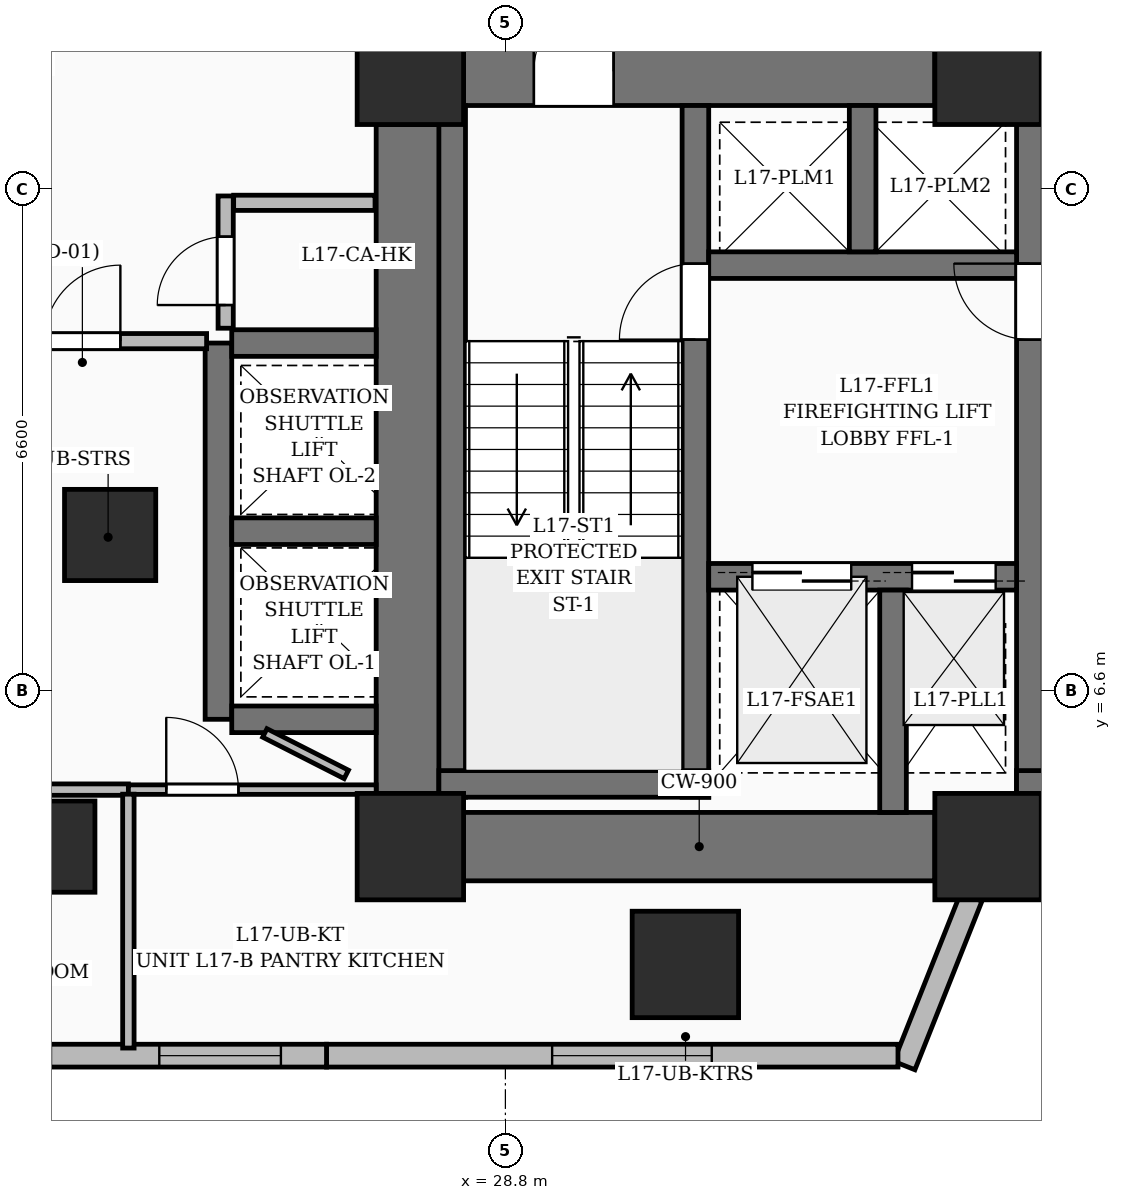
"""IFC4 building model, lengths in metres.
Left out: names, types, materials, properties, quantities, classifications, styles, units other than length and angle.
Written with IfcOpenShell. Run it as: python <this file> out.ifc"""

import sys

from ifc_helpers import new_model, si_unit, direction, frame, frame_2d, origin, origin_2d, place, context, subcontext, project, spatial, rectangle, extrude, element, fill, save


model = new_model("IFC4")
c1 = context("Model", 3, precision=1e-05, world=origin(), true_north=direction((0.0, 1.0)))
c2 = subcontext(c1, "Body", "Model", "MODEL_VIEW")
j1 = project(units=[si_unit("LENGTHUNIT", "METRE"), si_unit("PLANEANGLEUNIT", "RADIAN")], contexts=[c1])
p1 = place(None, origin())
s1 = spatial("IfcSite", under=j1, at=p1, CompositionType="ELEMENT")
p2 = place(p1, origin())
s2 = spatial("IfcBuilding", under=s1, at=p2, CompositionType="ELEMENT")
p3 = place(p2, frame((0.0, 0.0, 71.4)))
s3 = spatial("IfcBuildingStorey", under=s2, at=p3, CompositionType="ELEMENT", Elevation=71.4)
for number, where, z_axis, x_axis in (
    (1, (27.55, 4.55, 0.0), (0.0, 0.0, 1.0), (1.0, 0.0, 0.0)),
    (2, (35.15, 4.55, 0.0), (0.0, 0.0, 1.0), (1.0, 0.0, 0.0)),
    (3, (27.55, 14.75, 0.0), (0.0, 0.0, 1.0), (1.0, 0.0, 0.0)),
    (4, (35.15, 14.75, 0.0), (0.0, 0.0, 1.0), (1.0, 0.0, 0.0)),
):
    element("IfcColumn", number, at=place(p3, frame(where, z_axis=z_axis, x_axis=x_axis)), inside=s3, PredefinedType="COLUMN", context=c2, shape_type="SweptSolid", body=[
        extrude(rectangle(XDim=1.4, YDim=1.4, at=origin_2d()), origin(), (0.0, 0.0, 1.0), 3.6),
    ])
for number, where, z_axis, x_axis in (
    (5, (22.8, 4.55, 0.0), (0.0, 0.0, 1.0), (1.0, 0.0, 0.0)),
    (6, (23.6, 8.65, 0.0), (0.0, 0.0, 1.0), (1.0, 0.0, 0.0)),
):
    element("IfcColumn", number, at=place(p3, frame(where, z_axis=z_axis, x_axis=x_axis)), inside=s3, PredefinedType="COLUMN", context=c2, shape_type="SweptSolid", body=[
        extrude(rectangle(XDim=1.2, YDim=1.2, at=origin_2d()), origin(), (0.0, 0.0, 1.0), 3.6),
    ])
p4 = place(p3, frame((28.25, 4.55, 0.0), z_axis=(0.0, 0.0, 1.0), x_axis=(1.0, 0.0, 0.0)))
e7 = element("IfcWall", 7, at=p4, inside=s3, PredefinedType="SHEAR", context=c2, shape_type="SweptSolid", body=[
    extrude(rectangle(XDim=6.2, YDim=0.9, at=frame_2d((3.1, 0.0))), origin(), (0.0, 0.0, 1.0), 3.6),
])
p5 = place(p3, frame((28.25, 14.75, 0.0), z_axis=(0.0, 0.0, 1.0), x_axis=(1.0, 0.0, 0.0)))
e8 = element("IfcWall", 8, at=p5, inside=s3, PredefinedType="SHEAR", context=c2, shape_type="SweptSolid", body=[
    extrude(rectangle(XDim=6.2, YDim=0.9, at=frame_2d((3.1, 0.0))), origin(), (0.0, 0.0, 1.0), 3.6),
])
p6 = place(p5, frame((0.925, 0.0, 0.0)))
e9 = element("IfcOpeningElement", 9, at=p6, cuts=e8, PredefinedType="OPENING", context=c2, shape_type="SweptSolid", body=[
    extrude(rectangle(XDim=1.05, YDim=2.15, at=frame_2d((0.525, 1.075))), frame((0.0, 0.46, 0.0), z_axis=(0.0, -1.0, 0.0), x_axis=(1.0, 0.0, 0.0)), (0.0, 0.0, 1.0), 0.92),
])
p7 = place(p3, frame((27.55, 5.25, 0.0), z_axis=(0.0, 0.0, 1.0), x_axis=(0.0, 1.0, 0.0)))
e10 = element("IfcWall", 10, at=p7, inside=s3, PredefinedType="SHEAR", context=c2, shape_type="SweptSolid", body=[
    extrude(rectangle(XDim=8.8, YDim=0.9, at=frame_2d((4.4, 0.0))), origin(), (0.0, 0.0, 1.0), 3.6),
])
p8 = place(p3, frame((28.1, 5.2, 0.0), z_axis=(0.0, 0.0, 1.0), x_axis=(0.0, 1.0, 0.0)))
e11 = element("IfcWall", 11, at=p8, inside=s3, PredefinedType="SOLIDWALL", context=c2, shape_type="SweptSolid", body=[
    extrude(rectangle(XDim=9.1, YDim=0.35, at=frame_2d((4.55, 0.0))), origin(), (0.0, 0.0, 1.0), 3.6),
])
p9 = place(p3, frame((31.3, 5.2, 0.0), z_axis=(0.0, 0.0, 1.0), x_axis=(0.0, 1.0, 0.0)))
e12 = element("IfcWall", 12, at=p9, inside=s3, PredefinedType="SOLIDWALL", context=c2, shape_type="SweptSolid", body=[
    extrude(rectangle(XDim=9.1, YDim=0.35, at=frame_2d((4.55, 0.0))), origin(), (0.0, 0.0, 1.0), 3.6),
])
p10 = place(p9, frame((6.02, 0.0, 0.0)))
e13 = element("IfcOpeningElement", 13, at=p10, cuts=e12, PredefinedType="OPENING", context=c2, shape_type="SweptSolid", body=[
    extrude(rectangle(XDim=1.0, YDim=2.15, at=frame_2d((0.5, 1.075))), frame((0.0, 0.185, 0.0), z_axis=(0.0, -1.0, 0.0), x_axis=(1.0, 0.0, 0.0)), (0.0, 0.0, 1.0), 0.37),
])
p11 = place(p3, frame((27.925, 5.375, 0.0), z_axis=(0.0, 0.0, 1.0), x_axis=(1.0, 0.0, 0.0)))
e14 = element("IfcWall", 14, at=p11, inside=s3, PredefinedType="SOLIDWALL", context=c2, shape_type="SweptSolid", body=[
    extrude(rectangle(XDim=3.55, YDim=0.35, at=frame_2d((1.775, 0.0))), origin(), (0.0, 0.0, 1.0), 3.6),
])
p12 = place(p3, frame((35.7, 5.2, 0.0), z_axis=(0.0, 0.0, 1.0), x_axis=(0.0, 1.0, 0.0)))
e15 = element("IfcWall", 15, at=p12, inside=s3, PredefinedType="SOLIDWALL", context=c2, shape_type="SweptSolid", body=[
    extrude(rectangle(XDim=9.1, YDim=0.35, at=frame_2d((4.55, 0.0))), origin(), (0.0, 0.0, 1.0), 3.6),
])
p13 = place(p12, frame((6.02, 0.0, 0.0)))
e16 = element("IfcOpeningElement", 16, at=p13, cuts=e15, PredefinedType="OPENING", context=c2, shape_type="SweptSolid", body=[
    extrude(rectangle(XDim=1.0, YDim=2.15, at=frame_2d((0.5, 1.075))), frame((0.0, 0.185, 0.0), z_axis=(0.0, -1.0, 0.0), x_axis=(1.0, 0.0, 0.0)), (0.0, 0.0, 1.0), 0.37),
])
p14 = place(p3, frame((35.525, 5.375, 0.0), z_axis=(0.0, 0.0, 1.0), x_axis=(1.0, 0.0, 0.0)))
e17 = element("IfcWall", 17, at=p14, inside=s3, PredefinedType="SOLIDWALL", context=c2, shape_type="SweptSolid", body=[
    extrude(rectangle(XDim=3.55, YDim=0.35, at=frame_2d((1.775, 0.0))), origin(), (0.0, 0.0, 1.0), 3.6),
])
p15 = place(p3, frame((31.475, 8.1, 0.0), z_axis=(0.0, 0.0, 1.0), x_axis=(1.0, 0.0, 0.0)))
e18 = element("IfcWall", 18, at=p15, inside=s3, PredefinedType="SOLIDWALL", context=c2, shape_type="SweptSolid", body=[
    extrude(rectangle(XDim=4.05, YDim=0.35, at=frame_2d((2.025, 0.0))), origin(), (0.0, 0.0, 1.0), 3.6),
])
p16 = place(p15, frame((0.575, 0.0, 0.0)))
e19 = element("IfcOpeningElement", 19, at=p16, cuts=e18, PredefinedType="OPENING", context=c2, shape_type="SweptSolid", body=[
    extrude(rectangle(XDim=1.3, YDim=2.25, at=frame_2d((0.65, 1.125))), frame((0.0, 0.185, 0.0), z_axis=(0.0, -1.0, 0.0), x_axis=(1.0, 0.0, 0.0)), (0.0, 0.0, 1.0), 0.37),
])
p17 = place(p15, frame((2.675, 0.0, 0.0)))
e20 = element("IfcOpeningElement", 20, at=p17, cuts=e18, PredefinedType="OPENING", context=c2, shape_type="SweptSolid", body=[
    extrude(rectangle(XDim=1.1, YDim=2.2, at=frame_2d((0.55, 1.1))), frame((0.0, 0.185, 0.0), z_axis=(0.0, -1.0, 0.0), x_axis=(1.0, 0.0, 0.0)), (0.0, 0.0, 1.0), 0.37),
])
p18 = place(p3, frame((33.9, 5.0, 0.0), z_axis=(0.0, 0.0, 1.0), x_axis=(0.0, 1.0, 0.0)))
e21 = element("IfcWall", 21, at=p18, inside=s3, PredefinedType="SOLIDWALL", context=c2, shape_type="SweptSolid", body=[
    extrude(rectangle(XDim=2.925, YDim=0.35, at=frame_2d((1.462, 0.0))), origin(), (0.0, 0.0, 1.0), 3.6),
])
p19 = place(p3, frame((31.475, 12.2, 0.0), z_axis=(0.0, 0.0, 1.0), x_axis=(1.0, 0.0, 0.0)))
e22 = element("IfcWall", 22, at=p19, inside=s3, PredefinedType="SOLIDWALL", context=c2, shape_type="SweptSolid", body=[
    extrude(rectangle(XDim=4.05, YDim=0.35, at=frame_2d((2.025, 0.0))), origin(), (0.0, 0.0, 1.0), 3.6),
])
p20 = place(p3, frame((33.5, 12.375, 0.0), z_axis=(0.0, 0.0, 1.0), x_axis=(0.0, 1.0, 0.0)))
e23 = element("IfcWall", 23, at=p20, inside=s3, PredefinedType="SOLIDWALL", context=c2, shape_type="SweptSolid", body=[
    extrude(rectangle(XDim=1.925, YDim=0.35, at=frame_2d((0.962, 0.0))), origin(), (0.0, 0.0, 1.0), 3.6),
])
p21 = place(p3, frame((25.025, 6.225, 0.0), z_axis=(0.0, 0.0, 1.0), x_axis=(0.0, 1.0, 0.0)))
e24 = element("IfcWall", 24, at=p21, inside=s3, PredefinedType="SOLIDWALL", context=c2, shape_type="SweptSolid", body=[
    extrude(rectangle(XDim=4.95, YDim=0.35, at=frame_2d((2.475, 0.0))), origin(), (0.0, 0.0, 1.0), 3.6),
])
for number, where, z_axis, x_axis in (
    (25, (25.2, 6.225, 0.0), (0.0, 0.0, 1.0), (1.0, 0.0, 0.0)),
    (26, (25.2, 8.7, 0.0), (0.0, 0.0, 1.0), (1.0, 0.0, 0.0)),
    (27, (25.2, 11.175, 0.0), (0.0, 0.0, 1.0), (1.0, 0.0, 0.0)),
):
    element("IfcWall", number, at=place(p3, frame(where, z_axis=z_axis, x_axis=x_axis)), inside=s3, PredefinedType="SOLIDWALL", context=c2, shape_type="SweptSolid", body=[
        extrude(rectangle(XDim=1.9, YDim=0.35, at=frame_2d((0.95, 0.0))), origin(), (0.0, 0.0, 1.0), 3.6),
    ])
p22 = place(p3, frame((31.168, 3.0, 0.0), z_axis=(0.0, 0.0, 1.0), x_axis=(1.0, 0.0, 0.0)))
e28 = element("IfcColumn", 28, at=p22, inside=s3, PredefinedType="COLUMN", context=c2, shape_type="SweptSolid", body=[
    extrude(rectangle(XDim=1.4, YDim=1.4, at=origin_2d()), origin(), (0.0, 0.0, 1.0), 3.6),
])
p23 = place(p3, frame((34.93, 3.888, 0.0), z_axis=(0.0, 0.0, 1.0), x_axis=(-0.369538313764, -0.9292154942, 0.0)))
e29 = element("IfcWall", 29, at=p23, inside=s3, PredefinedType="SOLIDWALL", context=c2, shape_type="SweptSolid", body=[
    extrude(rectangle(XDim=2.387, YDim=0.3, at=frame_2d((1.193, 0.0))), origin(), (0.0, 0.0, 1.0), 2.3),
])
p24 = place(p3, frame((33.965, 1.8, 0.0), z_axis=(0.0, 0.0, 1.0), x_axis=(-1.0, 0.0, 0.0)))
e30 = element("IfcWall", 30, at=p24, inside=s3, PredefinedType="SOLIDWALL", context=c2, shape_type="SweptSolid", body=[
    extrude(rectangle(XDim=7.518, YDim=0.3, at=frame_2d((3.759, 0.0))), origin(), (0.0, 0.0, 1.0), 3.35),
])
p25 = place(p24, frame((2.45, 0.0, 0.55)))
e31 = element("IfcOpeningElement", 31, at=p25, cuts=e30, PredefinedType="OPENING", context=c2, shape_type="SweptSolid", body=[
    extrude(rectangle(XDim=2.1, YDim=2.4, at=frame_2d((1.05, 1.2))), frame((0.0, 0.16, 0.0), z_axis=(0.0, -1.0, 0.0), x_axis=(1.0, 0.0, 0.0)), (0.0, 0.0, 1.0), 0.32),
])
p26 = place(p3, frame((26.447, 1.8, 0.0), z_axis=(0.0, 0.0, 1.0), x_axis=(-1.0, 0.0, 0.0)))
e32 = element("IfcWall", 32, at=p26, inside=s3, PredefinedType="SOLIDWALL", context=c2, shape_type="SweptSolid", body=[
    extrude(rectangle(XDim=7.793, YDim=0.3, at=frame_2d((3.897, 0.0))), origin(), (0.0, 0.0, 1.0), 3.35),
])
p27 = place(p26, frame((3.625, 0.0, 0.6)))
e33 = element("IfcOpeningElement", 33, at=p27, cuts=e32, PredefinedType="OPENING", context=c2, shape_type="SweptSolid", body=[
    extrude(rectangle(XDim=1.8, YDim=2.1, at=frame_2d((0.9, 1.05))), frame((0.0, 0.16, 0.0), z_axis=(0.0, -1.0, 0.0), x_axis=(1.0, 0.0, 0.0)), (0.0, 0.0, 1.0), 0.32),
])
p28 = place(p26, frame((0.6, 0.0, 0.55)))
e34 = element("IfcOpeningElement", 34, at=p28, cuts=e32, PredefinedType="OPENING", context=c2, shape_type="SweptSolid", body=[
    extrude(rectangle(XDim=1.6, YDim=2.2, at=frame_2d((0.8, 1.1))), frame((0.0, 0.16, 0.0), z_axis=(0.0, -1.0, 0.0), x_axis=(1.0, 0.0, 0.0)), (0.0, 0.0, 1.0), 0.32),
])
p29 = place(p3, frame((25.12, 11.37, 0.0), z_axis=(0.0, 0.0, 1.0), x_axis=(0.0, 1.0, 0.0)))
e35 = element("IfcWall", 35, at=p29, inside=s3, PredefinedType="PARTITIONING", context=c2, shape_type="SweptSolid", body=[
    extrude(rectangle(XDim=1.74, YDim=0.2, at=frame_2d((0.87, 0.0))), origin(), (0.0, 0.0, 1.0), 3.35),
])
p30 = place(p29, frame((0.305, 0.0, 0.0)))
e36 = element("IfcOpeningElement", 36, at=p30, cuts=e35, PredefinedType="OPENING", context=c2, shape_type="SweptSolid", body=[
    extrude(rectangle(XDim=0.9, YDim=2.1, at=frame_2d((0.45, 1.05))), frame((0.0, 0.11, 0.0), z_axis=(0.0, -1.0, 0.0), x_axis=(1.0, 0.0, 0.0)), (0.0, 0.0, 1.0), 0.22),
])
p31 = place(p3, frame((25.225, 13.02, 0.0), z_axis=(0.0, 0.0, 1.0), x_axis=(1.0, 0.0, 0.0)))
e37 = element("IfcWall", 37, at=p31, inside=s3, PredefinedType="PARTITIONING", context=c2, shape_type="SweptSolid", body=[
    extrude(rectangle(XDim=1.86, YDim=0.2, at=frame_2d((0.93, 0.0))), origin(), (0.0, 0.0, 1.0), 3.35),
])
p32 = place(p3, frame((21.485, 11.2, 0.0), z_axis=(0.0, 0.0, 1.0), x_axis=(1.0, 0.0, 0.0)))
e38 = element("IfcWall", 38, at=p32, inside=s3, PredefinedType="PARTITIONING", context=c2, shape_type="SweptSolid", body=[
    extrude(rectangle(XDim=3.384, YDim=0.2, at=frame_2d((1.692, 0.0))), origin(), (0.0, 0.0, 1.0), 2.86),
])
p33 = place(p32, frame((1.25, 0.0, 0.0)))
e39 = element("IfcOpeningElement", 39, at=p33, cuts=e38, PredefinedType="OPENING", context=c2, shape_type="SweptSolid", body=[
    extrude(rectangle(XDim=1.0, YDim=2.2, at=frame_2d((0.5, 1.1))), frame((0.0, 0.11, 0.0), z_axis=(0.0, -1.0, 0.0), x_axis=(1.0, 0.0, 0.0)), (0.0, 0.0, 1.0), 0.22),
])
p34 = place(p3, frame((18.145, 5.3, 0.0), z_axis=(0.0, 0.0, 1.0), x_axis=(1.0, 0.0, 0.0)))
e40 = element("IfcWall", 40, at=p34, inside=s3, PredefinedType="PARTITIONING", context=c2, shape_type="SweptSolid", body=[
    extrude(rectangle(XDim=5.695, YDim=0.15, at=frame_2d((2.848, 0.0))), origin(), (0.0, 0.0, 1.0), 3.35),
])
p35 = place(p34, frame((2.32, 0.0, 0.0)))
e41 = element("IfcOpeningElement", 41, at=p35, cuts=e40, PredefinedType="OPENING", context=c2, shape_type="SweptSolid", body=[
    extrude(rectangle(XDim=0.85, YDim=2.1, at=frame_2d((0.425, 1.05))), frame((0.0, 0.085, 0.0), z_axis=(0.0, -1.0, 0.0), x_axis=(1.0, 0.0, 0.0)), (0.0, 0.0, 1.0), 0.17),
])
p36 = place(p3, frame((23.84, 5.3, 0.0), z_axis=(0.0, 0.0, 1.0), x_axis=(1.0, 0.0, 0.0)))
e42 = element("IfcWall", 42, at=p36, inside=s3, PredefinedType="PARTITIONING", context=c2, shape_type="SweptSolid", body=[
    extrude(rectangle(XDim=3.26, YDim=0.125, at=frame_2d((1.63, 0.0))), origin(), (0.0, 0.0, 1.0), 3.35),
])
p37 = place(p36, frame((0.498, 0.0, 0.0)))
e43 = element("IfcOpeningElement", 43, at=p37, cuts=e42, PredefinedType="OPENING", context=c2, shape_type="SweptSolid", body=[
    extrude(rectangle(XDim=0.95, YDim=2.2, at=frame_2d((0.475, 1.1))), frame((0.0, 0.072, 0.0), z_axis=(0.0, -1.0, 0.0), x_axis=(1.0, 0.0, 0.0)), (0.0, 0.0, 1.0), 0.145),
])
p38 = place(p3, frame((23.84, 1.9, 0.0), z_axis=(0.0, 0.0, 1.0), x_axis=(0.0, 1.0, 0.0)))
e44 = element("IfcWall", 44, at=p38, inside=s3, PredefinedType="PARTITIONING", context=c2, shape_type="SweptSolid", body=[
    extrude(rectangle(XDim=3.34, YDim=0.15, at=frame_2d((1.67, 0.0))), origin(), (0.0, 0.0, 1.0), 1.12),
])
p39 = place(p3, frame((25.635, 6.046, 0.0), z_axis=(0.0, 0.0, 1.0), x_axis=(0.891197428161, -0.453615634694, 0.0)))
e45 = element("IfcWall", 45, at=p39, inside=s3, PredefinedType="PARTITIONING", context=c2, shape_type="SweptSolid", body=[
    extrude(rectangle(XDim=1.203, YDim=0.125, at=frame_2d((0.602, 0.0))), origin(), (0.0, 0.0, 1.0), 3.35),
])
p40 = place(p25, origin())
e46 = element("IfcWindow", 46, at=p40, inside=s3, PartitioningType="SINGLE_PANEL", PredefinedType="WINDOW", context=c2, shape_type="SweptSolid", body=[
    extrude(rectangle(XDim=2.1, YDim=2.4, at=frame_2d((1.05, 1.2))), frame((0.0, 0.03, 0.0), z_axis=(0.0, -1.0, 0.0), x_axis=(1.0, 0.0, 0.0)), (0.0, 0.0, 1.0), 0.06),
])
fill(e31, e46)
p41 = place(p28, origin())
e47 = element("IfcWindow", 47, at=p41, inside=s3, PartitioningType="SINGLE_PANEL", PredefinedType="WINDOW", context=c2, shape_type="SweptSolid", body=[
    extrude(rectangle(XDim=1.6, YDim=2.2, at=frame_2d((0.8, 1.1))), frame((0.0, 0.03, 0.0), z_axis=(0.0, -1.0, 0.0), x_axis=(1.0, 0.0, 0.0)), (0.0, 0.0, 1.0), 0.06),
])
fill(e34, e47)
p42 = place(p6, origin())
e48 = element("IfcDoor", 48, at=p42, inside=s3, OperationType="SINGLE_SWING_RIGHT", PredefinedType="DOOR", context=c2, shape_type="SweptSolid", body=[
    extrude(rectangle(XDim=1.05, YDim=2.15, at=frame_2d((0.525, 1.075))), frame((0.0, 0.025, 0.0), z_axis=(0.0, -1.0, 0.0), x_axis=(1.0, 0.0, 0.0)), (0.0, 0.0, 1.0), 0.05),
])
fill(e9, e48)
p43 = place(p10, origin())
e49 = element("IfcDoor", 49, at=p43, inside=s3, OperationType="SINGLE_SWING_LEFT", PredefinedType="DOOR", context=c2, shape_type="SweptSolid", body=[
    extrude(rectangle(XDim=1.0, YDim=2.15, at=frame_2d((0.5, 1.075))), frame((0.0, 0.025, 0.0), z_axis=(0.0, -1.0, 0.0), x_axis=(1.0, 0.0, 0.0)), (0.0, 0.0, 1.0), 0.05),
])
fill(e13, e49)
p44 = place(p13, origin())
e50 = element("IfcDoor", 50, at=p44, inside=s3, OperationType="SINGLE_SWING_RIGHT", PredefinedType="DOOR", context=c2, shape_type="SweptSolid", body=[
    extrude(rectangle(XDim=1.0, YDim=2.15, at=frame_2d((0.5, 1.075))), frame((0.0, 0.025, 0.0), z_axis=(0.0, -1.0, 0.0), x_axis=(1.0, 0.0, 0.0)), (0.0, 0.0, 1.0), 0.05),
])
fill(e16, e50)
p45 = place(p16, origin())
e51 = element("IfcDoor", 51, at=p45, inside=s3, OperationType="DOUBLE_DOOR_SLIDING", PredefinedType="DOOR", context=c2, shape_type="SweptSolid", body=[
    extrude(rectangle(XDim=1.3, YDim=2.25, at=frame_2d((0.65, 1.125))), frame((0.0, 0.025, 0.0), z_axis=(0.0, -1.0, 0.0), x_axis=(1.0, 0.0, 0.0)), (0.0, 0.0, 1.0), 0.05),
])
fill(e19, e51)
p46 = place(p17, origin())
e52 = element("IfcDoor", 52, at=p46, inside=s3, OperationType="DOUBLE_DOOR_SLIDING", PredefinedType="DOOR", context=c2, shape_type="SweptSolid", body=[
    extrude(rectangle(XDim=1.1, YDim=2.2, at=frame_2d((0.55, 1.1))), frame((0.0, 0.025, 0.0), z_axis=(0.0, -1.0, 0.0), x_axis=(1.0, 0.0, 0.0)), (0.0, 0.0, 1.0), 0.05),
])
fill(e20, e52)
p47 = place(p30, origin())
e53 = element("IfcDoor", 53, at=p47, inside=s3, OperationType="SINGLE_SWING_LEFT", PredefinedType="DOOR", context=c2, shape_type="SweptSolid", body=[
    extrude(rectangle(XDim=0.9, YDim=2.1, at=frame_2d((0.45, 1.05))), frame((0.0, 0.025, 0.0), z_axis=(0.0, -1.0, 0.0), x_axis=(1.0, 0.0, 0.0)), (0.0, 0.0, 1.0), 0.05),
])
fill(e36, e53)
p48 = place(p33, origin())
e54 = element("IfcDoor", 54, at=p48, inside=s3, OperationType="SINGLE_SWING_RIGHT", PredefinedType="DOOR", context=c2, shape_type="SweptSolid", body=[
    extrude(rectangle(XDim=1.0, YDim=2.2, at=frame_2d((0.5, 1.1))), frame((0.0, 0.025, 0.0), z_axis=(0.0, -1.0, 0.0), x_axis=(1.0, 0.0, 0.0)), (0.0, 0.0, 1.0), 0.05),
])
fill(e39, e54)
p49 = place(p37, origin())
e55 = element("IfcDoor", 55, at=p49, inside=s3, OperationType="SINGLE_SWING_LEFT", PredefinedType="DOOR", context=c2, shape_type="SweptSolid", body=[
    extrude(rectangle(XDim=0.95, YDim=2.2, at=frame_2d((0.475, 1.1))), frame((0.0, 0.025, 0.0), z_axis=(0.0, -1.0, 0.0), x_axis=(1.0, 0.0, 0.0)), (0.0, 0.0, 1.0), 0.05),
])
fill(e43, e55)
save(model, sys.argv[1])
